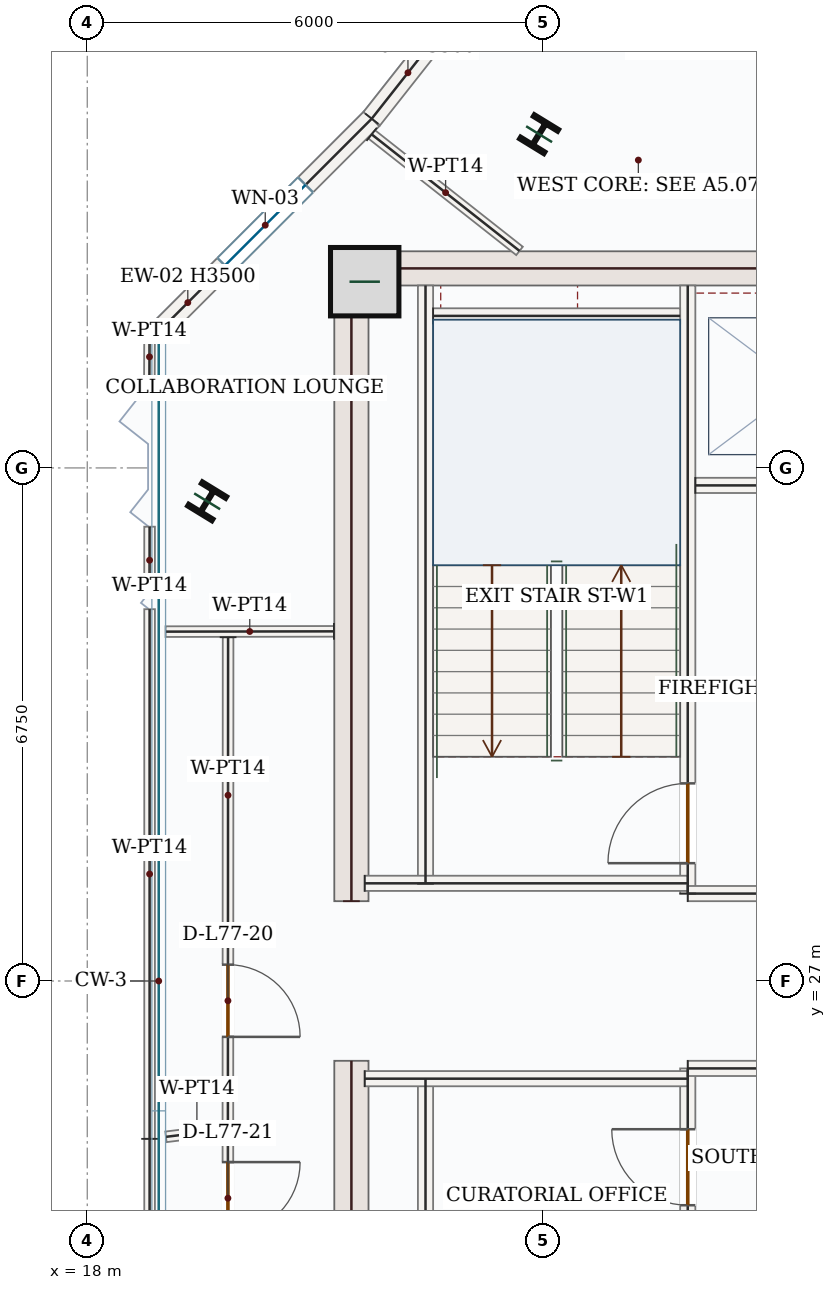
"""IFC4 building model, lengths in metres.
Left out: names, types, materials, properties, quantities, classifications, styles, units other than length and angle.
Written with IfcOpenShell. Run it as: python <this file> out.ifc"""

import sys

from ifc_helpers import new_model, si_unit, direction, frame, frame_2d, origin, origin_2d, place, context, subcontext, project, spatial, rectangle, i_section, extrude, source, transform, mapped, element, fill, save


model = new_model("IFC4")
c1 = context("Model", 3, precision=1e-05, world=origin(), true_north=direction((0.0, 1.0)))
c2 = subcontext(c1, "Body", "Model", "MODEL_VIEW")
j1 = project(units=[si_unit("LENGTHUNIT", "METRE"), si_unit("PLANEANGLEUNIT", "RADIAN")], contexts=[c1])
p1 = place(None, origin())
s1 = spatial("IfcSite", under=j1, at=p1, CompositionType="ELEMENT")
p2 = place(p1, origin())
s2 = spatial("IfcBuilding", under=s1, at=p2, CompositionType="ELEMENT")
p3 = place(p2, frame((0.0, 0.0, 319.8)))
s3 = spatial("IfcBuildingStorey", under=s2, at=p3, CompositionType="ELEMENT", Elevation=319.8)
m1 = source(origin(), c2, "Body", "SweptSolid", [
    extrude(rectangle(XDim=8.55, YDim=0.45, at=frame_2d((4.275, 0.0))), origin(), (0.0, 0.0, 1.0), 3.5),
])
for number, where, z_axis, x_axis in (
    (1, (21.475, 17.4, 0.0), (0.0, 0.0, 1.0), (0.0, 1.0, 0.0)),
    (2, (21.475, 28.05, 0.0), (0.0, 0.0, 1.0), (0.0, 1.0, 0.0)),
):
    element("IfcWall", number, at=place(p3, frame(where, z_axis=z_axis, x_axis=x_axis)), inside=s3, PredefinedType="SHEAR", context=c2, shape_type="MappedRepresentation", body=[
        mapped(m1, transform((0.0, 0.0, 0.0), x_axis=(1.0, 0.0, 0.0), y_axis=(0.0, 1.0, 0.0), z_axis=(0.0, 0.0, 1.0), scale=1.0)),
    ])
m2 = source(origin(), c2, "Body", "SweptSolid", [
    extrude(rectangle(XDim=7.1, YDim=0.45, at=frame_2d((3.55, 0.0))), origin(), (0.0, 0.0, 1.0), 3.5),
])
p4 = place(p3, frame((21.7, 36.375, 0.0), z_axis=(0.0, 0.0, 1.0), x_axis=(1.0, 0.0, 0.0)))
e3 = element("IfcWall", 3, at=p4, inside=s3, PredefinedType="SHEAR", context=c2, shape_type="MappedRepresentation", body=[
    mapped(m2, transform((0.0, 0.0, 0.0), x_axis=(1.0, 0.0, 0.0), y_axis=(0.0, 1.0, 0.0), z_axis=(0.0, 0.0, 1.0), scale=1.0)),
])
m3 = source(origin(), c2, "Body", "SweptSolid", [
    extrude(rectangle(XDim=0.9, YDim=0.9, at=origin_2d()), origin(), (0.0, 0.0, 1.0), 3.75),
])
p5 = place(p3, frame((21.65, 36.2, 0.0), z_axis=(0.0, 0.0, 1.0), x_axis=(1.0, 0.0, 0.0)))
e4 = element("IfcColumn", 4, at=p5, inside=s3, PredefinedType="COLUMN", context=c2, shape_type="MappedRepresentation", body=[
    mapped(m3, transform((0.0, 0.0, 0.0), x_axis=(1.0, 0.0, 0.0), y_axis=(0.0, 1.0, 0.0), z_axis=(0.0, 0.0, 1.0), scale=1.0)),
])
m4 = source(origin(), c2, "Body", "SweptSolid", [
    extrude(i_section(OverallWidth=0.374, OverallDepth=0.372, WebThickness=0.016, FlangeThickness=0.026, FilletRadius=0.018, at=origin_2d()), origin(), (0.0, 0.0, 1.0), 3.75),
])
for number, where, z_axis, x_axis in (
    (5, (23.945, 38.141, 0.0), (0.0, 0.0, 1.0), (-0.853, 0.522, 0.0)),
    (6, (19.577, 33.311, 0.0), (0.0, 0.0, 1.0), (-0.853, 0.522, 0.0)),
):
    element("IfcColumn", number, at=place(p3, frame(where, z_axis=z_axis, x_axis=x_axis)), inside=s3, PredefinedType="COLUMN", context=c2, shape_type="MappedRepresentation", body=[
        mapped(m4, transform((0.0, 0.0, 0.0), x_axis=(1.0, 0.0, 0.0), y_axis=(0.0, 1.0, 0.0), z_axis=(0.0, 0.0, 1.0), scale=1.0)),
    ])
p6 = place(p3, frame((18.94, 35.542, 0.0), z_axis=(0.0, 0.0, 1.0), x_axis=(0.707106781187, 0.707106781187, 0.0)))
e7 = element("IfcWall", 7, at=p6, inside=s3, PredefinedType="SOLIDWALL", context=c2, shape_type="SweptSolid", body=[
    extrude(rectangle(XDim=3.963, YDim=0.28, at=frame_2d((1.982, 0.0))), origin(), (0.0, 0.0, 1.0), 3.5),
])
p7 = place(p6, frame((1.232, 0.0, 0.85)))
e8 = element("IfcOpeningElement", 8, at=p7, cuts=e7, PredefinedType="OPENING", context=c2, shape_type="SweptSolid", body=[
    extrude(rectangle(XDim=1.5, YDim=1.5, at=frame_2d((0.75, 0.75))), frame((0.0, 0.15, 0.0), z_axis=(0.0, -1.0, 0.0), x_axis=(1.0, 0.0, 0.0)), (0.0, 0.0, 1.0), 0.3),
])
p8 = place(p3, frame((21.742, 38.344, 0.0), z_axis=(0.0, 0.0, 1.0), x_axis=(0.619093990715, 0.785316898239, 0.0)))
e9 = element("IfcWall", 9, at=p8, inside=s3, PredefinedType="SOLIDWALL", context=c2, shape_type="SweptSolid", body=[
    extrude(rectangle(XDim=4.878, YDim=0.28, at=frame_2d((2.439, 0.0))), origin(), (0.0, 0.0, 1.0), 3.5),
])
p9 = place(p8, frame((1.689, 0.0, 0.85)))
e10 = element("IfcOpeningElement", 10, at=p9, cuts=e9, PredefinedType="OPENING", context=c2, shape_type="SweptSolid", body=[
    extrude(rectangle(XDim=1.5, YDim=1.5, at=frame_2d((0.75, 0.75))), frame((0.0, 0.15, 0.0), z_axis=(0.0, -1.0, 0.0), x_axis=(1.0, 0.0, 0.0)), (0.0, 0.0, 1.0), 0.3),
])
m5 = source(origin(), c2, "Body", "SweptSolid", [
    extrude(rectangle(XDim=7.87, YDim=0.2, at=frame_2d((3.935, 0.0))), origin(), (0.0, 0.0, 1.0), 3.5),
])
for number, where, z_axis, x_axis in (
    (11, (22.45, 17.85, 0.0), (0.0, 0.0, 1.0), (0.0, 1.0, 0.0)),
    (12, (22.45, 28.28, 0.0), (0.0, 0.0, 1.0), (0.0, 1.0, 0.0)),
):
    element("IfcWall", number, at=place(p3, frame(where, z_axis=z_axis, x_axis=x_axis)), inside=s3, PredefinedType="SOLIDWALL", context=c2, shape_type="MappedRepresentation", body=[
        mapped(m5, transform((0.0, 0.0, 0.0), x_axis=(1.0, 0.0, 0.0), y_axis=(0.0, 1.0, 0.0), z_axis=(0.0, 0.0, 1.0), scale=1.0)),
    ])
p10 = place(p3, frame((25.9, 17.85, 0.0), z_axis=(0.0, 0.0, 1.0), x_axis=(0.0, 1.0, 0.0)))
e13 = element("IfcWall", 13, at=p10, inside=s3, PredefinedType="SOLIDWALL", context=c2, shape_type="SweptSolid", body=[
    extrude(rectangle(XDim=8.0, YDim=0.2, at=frame_2d((4.0, 0.0))), origin(), (0.0, 0.0, 1.0), 3.5),
])
p11 = place(p10, frame((6.2, 0.0, 0.0)))
e14 = element("IfcOpeningElement", 14, at=p11, cuts=e13, PredefinedType="OPENING", context=c2, shape_type="SweptSolid", body=[
    extrude(rectangle(XDim=1.0, YDim=2.15, at=frame_2d((0.5, 1.075))), frame((0.0, 0.11, 0.0), z_axis=(0.0, -1.0, 0.0), x_axis=(1.0, 0.0, 0.0)), (0.0, 0.0, 1.0), 0.22),
])
p12 = place(p10, frame((0.6, 0.0, 0.0)))
e15 = element("IfcOpeningElement", 15, at=p12, cuts=e13, PredefinedType="OPENING", context=c2, shape_type="SweptSolid", body=[
    extrude(rectangle(XDim=0.88, YDim=2.1, at=frame_2d((0.44, 1.05))), frame((0.0, 0.11, 0.0), z_axis=(0.0, -1.0, 0.0), x_axis=(1.0, 0.0, 0.0)), (0.0, 0.0, 1.0), 0.22),
])
p13 = place(p3, frame((25.9, 28.15, 0.0), z_axis=(0.0, 0.0, 1.0), x_axis=(0.0, 1.0, 0.0)))
e16 = element("IfcWall", 16, at=p13, inside=s3, PredefinedType="SOLIDWALL", context=c2, shape_type="SweptSolid", body=[
    extrude(rectangle(XDim=8.0, YDim=0.2, at=frame_2d((4.0, 0.0))), origin(), (0.0, 0.0, 1.0), 3.5),
])
p14 = place(p13, frame((0.4, 0.0, 0.0)))
e17 = element("IfcOpeningElement", 17, at=p14, cuts=e16, PredefinedType="OPENING", context=c2, shape_type="SweptSolid", body=[
    extrude(rectangle(XDim=1.05, YDim=2.15, at=frame_2d((0.525, 1.075))), frame((0.0, 0.11, 0.0), z_axis=(0.0, -1.0, 0.0), x_axis=(1.0, 0.0, 0.0)), (0.0, 0.0, 1.0), 0.22),
])
m6 = source(origin(), c2, "Body", "SweptSolid", [
    extrude(rectangle(XDim=4.25, YDim=0.2, at=frame_2d((2.125, 0.0))), origin(), (0.0, 0.0, 1.0), 3.5),
])
p15 = place(p3, frame((21.65, 25.715, 0.0), z_axis=(0.0, 0.0, 1.0), x_axis=(1.0, 0.0, 0.0)))
e18 = element("IfcWall", 18, at=p15, inside=s3, PredefinedType="SOLIDWALL", context=c2, shape_type="MappedRepresentation", body=[
    mapped(m6, transform((0.0, 0.0, 0.0), x_axis=(1.0, 0.0, 0.0), y_axis=(0.0, 1.0, 0.0), z_axis=(0.0, 0.0, 1.0), scale=1.0)),
])
m7 = source(origin(), c2, "Body", "SweptSolid", [
    extrude(rectangle(XDim=3.0, YDim=0.2, at=frame_2d((1.5, 0.0))), origin(), (0.0, 0.0, 1.0), 3.5),
])
p16 = place(p3, frame((25.9, 25.85, 0.0), z_axis=(0.0, 0.0, 1.0), x_axis=(1.0, 0.0, 0.0)))
e19 = element("IfcWall", 19, at=p16, inside=s3, PredefinedType="SOLIDWALL", context=c2, shape_type="MappedRepresentation", body=[
    mapped(m7, transform((0.0, 0.0, 0.0), x_axis=(1.0, 0.0, 0.0), y_axis=(0.0, 1.0, 0.0), z_axis=(0.0, 0.0, 1.0), scale=1.0)),
])
p17 = place(p3, frame((21.65, 28.285, 0.0), z_axis=(0.0, 0.0, 1.0), x_axis=(1.0, 0.0, 0.0)))
e20 = element("IfcWall", 20, at=p17, inside=s3, PredefinedType="SOLIDWALL", context=c2, shape_type="MappedRepresentation", body=[
    mapped(m6, transform((0.0, 0.0, 0.0), x_axis=(1.0, 0.0, 0.0), y_axis=(0.0, 1.0, 0.0), z_axis=(0.0, 0.0, 1.0), scale=1.0)),
])
p18 = place(p3, frame((25.9, 28.15, 0.0), z_axis=(0.0, 0.0, 1.0), x_axis=(1.0, 0.0, 0.0)))
e21 = element("IfcWall", 21, at=p18, inside=s3, PredefinedType="SOLIDWALL", context=c2, shape_type="MappedRepresentation", body=[
    mapped(m7, transform((0.0, 0.0, 0.0), x_axis=(1.0, 0.0, 0.0), y_axis=(0.0, 1.0, 0.0), z_axis=(0.0, 0.0, 1.0), scale=1.0)),
])
m8 = source(origin(), c2, "Body", "SweptSolid", [
    extrude(rectangle(XDim=3.25, YDim=0.2, at=frame_2d((1.625, 0.0))), origin(), (0.0, 0.0, 1.0), 3.5),
])
p19 = place(p3, frame((22.55, 35.75, 0.0), z_axis=(0.0, 0.0, 1.0), x_axis=(1.0, 0.0, 0.0)))
e22 = element("IfcWall", 22, at=p19, inside=s3, PredefinedType="SOLIDWALL", context=c2, shape_type="MappedRepresentation", body=[
    mapped(m8, transform((0.0, 0.0, 0.0), x_axis=(1.0, 0.0, 0.0), y_axis=(0.0, 1.0, 0.0), z_axis=(0.0, 0.0, 1.0), scale=1.0)),
])
p20 = place(p3, frame((26.0, 33.52, 0.0), z_axis=(0.0, 0.0, 1.0), x_axis=(1.0, 0.0, 0.0)))
e23 = element("IfcWall", 23, at=p20, inside=s3, PredefinedType="SOLIDWALL", context=c2, shape_type="SweptSolid", body=[
    extrude(rectangle(XDim=2.75, YDim=0.2, at=frame_2d((1.375, 0.0))), origin(), (0.0, 0.0, 1.0), 3.5),
])
p21 = place(p20, frame((0.82, 0.0, 0.0)))
e24 = element("IfcOpeningElement", 24, at=p21, cuts=e23, PredefinedType="OPENING", context=c2, shape_type="SweptSolid", body=[
    extrude(rectangle(XDim=1.1, YDim=2.15, at=frame_2d((0.55, 1.075))), frame((0.0, 0.11, 0.0), z_axis=(0.0, -1.0, 0.0), x_axis=(1.0, 0.0, 0.0)), (0.0, 0.0, 1.0), 0.22),
])
m9 = source(origin(), c2, "Body", "SweptSolid", [
    extrude(rectangle(XDim=2.215, YDim=0.14, at=frame_2d((1.107, 0.0))), origin(), (0.0, 0.0, 1.0), 3.5),
])
p22 = place(p3, frame((21.245, 31.6, 0.0), z_axis=(0.0, 0.0, 1.0), x_axis=(-0.999998633374, -0.001653254657, 0.0)))
e25 = element("IfcWall", 25, at=p22, inside=s3, PredefinedType="PARTITIONING", context=c2, shape_type="MappedRepresentation", body=[
    mapped(m9, transform((0.0, 0.0, 0.0), x_axis=(1.0, 0.0, 0.0), y_axis=(0.0, 1.0, 0.0), z_axis=(0.0, 0.0, 1.0), scale=1.0)),
])
p23 = place(p3, frame((19.853, 31.523, 0.0), z_axis=(0.0, 0.0, 1.0), x_axis=(-0.000377187662, -0.999999928865, 0.0)))
e26 = element("IfcWall", 26, at=p23, inside=s3, PredefinedType="PARTITIONING", context=c2, shape_type="SweptSolid", body=[
    extrude(rectangle(XDim=6.473, YDim=0.14, at=frame_2d((3.236, 0.0))), origin(), (0.0, 0.0, 1.0), 3.5),
])
p24 = place(p23, frame((4.308, 0.0, 0.0)))
e27 = element("IfcOpeningElement", 27, at=p24, cuts=e26, PredefinedType="OPENING", context=c2, shape_type="SweptSolid", body=[
    extrude(rectangle(XDim=0.95, YDim=2.15, at=frame_2d((0.475, 1.075))), frame((0.0, 0.08, 0.0), z_axis=(0.0, -1.0, 0.0), x_axis=(1.0, 0.0, 0.0)), (0.0, 0.0, 1.0), 0.16),
])
m10 = source(origin(), c2, "Body", "SweptSolid", [
    extrude(rectangle(XDim=0.821, YDim=0.14, at=frame_2d((0.41, 0.0))), origin(), (0.0, 0.0, 1.0), 3.5),
])
p25 = place(p3, frame((19.85, 25.05, 0.0), z_axis=(0.0, 0.0, 1.0), x_axis=(-0.992500466698, -0.122240842617, 0.0)))
e28 = element("IfcWall", 28, at=p25, inside=s3, PredefinedType="PARTITIONING", context=c2, shape_type="MappedRepresentation", body=[
    mapped(m10, transform((0.0, 0.0, 0.0), x_axis=(1.0, 0.0, 0.0), y_axis=(0.0, 1.0, 0.0), z_axis=(0.0, 0.0, 1.0), scale=1.0)),
])
m11 = source(origin(), c2, "Body", "SweptSolid", [
    extrude(rectangle(XDim=6.968, YDim=0.14, at=frame_2d((3.484, 0.0))), origin(), (0.0, 0.0, 1.0), 3.5),
])
p26 = place(p3, frame((18.82, 24.923, 0.0), z_axis=(0.0, 0.0, 1.0), x_axis=(0.0, 1.0, 0.0)))
e29 = element("IfcWall", 29, at=p26, inside=s3, PredefinedType="PARTITIONING", context=c2, shape_type="MappedRepresentation", body=[
    mapped(m11, transform((0.0, 0.0, 0.0), x_axis=(1.0, 0.0, 0.0), y_axis=(0.0, 1.0, 0.0), z_axis=(0.0, 0.0, 1.0), scale=1.0)),
])
m12 = source(origin(), c2, "Body", "SweptSolid", [
    extrude(rectangle(XDim=0.882, YDim=0.14, at=frame_2d((0.441, 0.0))), origin(), (0.0, 0.0, 1.0), 3.5),
])
p27 = place(p3, frame((18.82, 32.095, 0.0), z_axis=(0.0, 0.0, 1.0), x_axis=(0.000553556516, 0.999999846788, 0.0)))
e30 = element("IfcWall", 30, at=p27, inside=s3, PredefinedType="PARTITIONING", context=c2, shape_type="MappedRepresentation", body=[
    mapped(m12, transform((0.0, 0.0, 0.0), x_axis=(1.0, 0.0, 0.0), y_axis=(0.0, 1.0, 0.0), z_axis=(0.0, 0.0, 1.0), scale=1.0)),
])
m13 = source(origin(), c2, "Body", "SweptSolid", [
    extrude(rectangle(XDim=0.762, YDim=0.14, at=frame_2d((0.381, 0.0))), origin(), (0.0, 0.0, 1.0), 3.5),
])
p28 = place(p3, frame((18.817, 34.83, 0.0), z_axis=(0.0, 0.0, 1.0), x_axis=(0.004166630498, 0.999991319557, 0.0)))
e31 = element("IfcWall", 31, at=p28, inside=s3, PredefinedType="PARTITIONING", context=c2, shape_type="MappedRepresentation", body=[
    mapped(m13, transform((0.0, 0.0, 0.0), x_axis=(1.0, 0.0, 0.0), y_axis=(0.0, 1.0, 0.0), z_axis=(0.0, 0.0, 1.0), scale=1.0)),
])
m14 = source(origin(), c2, "Body", "SweptSolid", [
    extrude(rectangle(XDim=2.477, YDim=0.14, at=frame_2d((1.239, 0.0))), origin(), (0.0, 0.0, 1.0), 3.5),
])
p29 = place(p3, frame((21.742, 38.138, 0.0), z_axis=(0.0, 0.0, 1.0), x_axis=(0.785339198937, -0.619065701371, 0.0)))
e32 = element("IfcWall", 32, at=p29, inside=s3, PredefinedType="PARTITIONING", context=c2, shape_type="MappedRepresentation", body=[
    mapped(m14, transform((0.0, 0.0, 0.0), x_axis=(1.0, 0.0, 0.0), y_axis=(0.0, 1.0, 0.0), z_axis=(0.0, 0.0, 1.0), scale=1.0)),
])
p30 = place(p3, frame((19.85, 24.975, 0.0), z_axis=(0.0, 0.0, 1.0), x_axis=(0.000379434615, -0.999999928015, 0.0)))
e33 = element("IfcWall", 33, at=p30, inside=s3, PredefinedType="PARTITIONING", context=c2, shape_type="SweptSolid", body=[
    extrude(rectangle(XDim=2.574, YDim=0.14, at=frame_2d((1.287, 0.0))), origin(), (0.0, 0.0, 1.0), 3.5),
])
p31 = place(p30, frame((0.357, 0.0, 0.0)))
e34 = element("IfcOpeningElement", 34, at=p31, cuts=e33, PredefinedType="OPENING", context=c2, shape_type="SweptSolid", body=[
    extrude(rectangle(XDim=0.95, YDim=2.15, at=frame_2d((0.475, 1.075))), frame((0.0, 0.08, 0.0), z_axis=(0.0, -1.0, 0.0), x_axis=(1.0, 0.0, 0.0)), (0.0, 0.0, 1.0), 0.16),
])
m15 = source(origin(), c2, "Body", "SweptSolid", [
    extrude(rectangle(XDim=6.515, YDim=0.14, at=frame_2d((3.258, 0.0))), origin(), (0.0, 0.0, 1.0), 3.5),
])
p32 = place(p3, frame((18.82, 18.408, 0.0), z_axis=(0.0, 0.0, 1.0), x_axis=(0.0, 1.0, 0.0)))
e35 = element("IfcWall", 35, at=p32, inside=s3, PredefinedType="PARTITIONING", context=c2, shape_type="MappedRepresentation", body=[
    mapped(m15, transform((0.0, 0.0, 0.0), x_axis=(1.0, 0.0, 0.0), y_axis=(0.0, 1.0, 0.0), z_axis=(0.0, 0.0, 1.0), scale=1.0)),
])
m16 = source(origin(), c2, "Body", "SweptSolid", [
    extrude(rectangle(XDim=1.5, YDim=1.5, at=frame_2d((0.75, 0.75))), frame((0.0, 0.03, 0.0), z_axis=(0.0, -1.0, 0.0), x_axis=(1.0, 0.0, 0.0)), (0.0, 0.0, 1.0), 0.06),
])
p33 = place(p7, origin())
e36 = element("IfcWindow", 36, at=p33, inside=s3, PartitioningType="SINGLE_PANEL", PredefinedType="WINDOW", context=c2, shape_type="MappedRepresentation", body=[
    mapped(m16, transform((0.0, 0.0, 0.0), x_axis=(1.0, 0.0, 0.0), y_axis=(0.0, 1.0, 0.0), z_axis=(0.0, 0.0, 1.0), scale=1.0)),
])
fill(e8, e36)
m17 = source(origin(), c2, "Body", "SweptSolid", [
    extrude(rectangle(XDim=1.05, YDim=2.15, at=frame_2d((0.525, 1.075))), frame((0.0, 0.025, 0.0), z_axis=(0.0, -1.0, 0.0), x_axis=(1.0, 0.0, 0.0)), (0.0, 0.0, 1.0), 0.05),
])
p34 = place(p14, origin())
e37 = element("IfcDoor", 37, at=p34, inside=s3, OperationType="SINGLE_SWING_LEFT", PredefinedType="DOOR", context=c2, shape_type="MappedRepresentation", body=[
    mapped(m17, transform((0.0, 0.0, 0.0), x_axis=(1.0, 0.0, 0.0), y_axis=(0.0, 1.0, 0.0), z_axis=(0.0, 0.0, 1.0), scale=1.0)),
])
fill(e17, e37)
m18 = source(origin(), c2, "Body", "SweptSolid", [
    extrude(rectangle(XDim=1.0, YDim=2.15, at=frame_2d((0.5, 1.075))), frame((0.0, 0.025, 0.0), z_axis=(0.0, -1.0, 0.0), x_axis=(1.0, 0.0, 0.0)), (0.0, 0.0, 1.0), 0.05),
])
p35 = place(p11, origin())
e38 = element("IfcDoor", 38, at=p35, inside=s3, OperationType="SINGLE_SWING_RIGHT", PredefinedType="DOOR", context=c2, shape_type="MappedRepresentation", body=[
    mapped(m18, transform((0.0, 0.0, 0.0), x_axis=(1.0, 0.0, 0.0), y_axis=(0.0, 1.0, 0.0), z_axis=(0.0, 0.0, 1.0), scale=1.0)),
])
fill(e14, e38)
m19 = source(origin(), c2, "Body", "SweptSolid", [
    extrude(rectangle(XDim=0.95, YDim=2.15, at=frame_2d((0.475, 1.075))), frame((0.0, 0.025, 0.0), z_axis=(0.0, -1.0, 0.0), x_axis=(1.0, 0.0, 0.0)), (0.0, 0.0, 1.0), 0.05),
])
p36 = place(p24, origin())
e39 = element("IfcDoor", 39, at=p36, inside=s3, OperationType="SINGLE_SWING_RIGHT", PredefinedType="DOOR", context=c2, shape_type="MappedRepresentation", body=[
    mapped(m19, transform((0.0, 0.0, 0.0), x_axis=(1.0, 0.0, 0.0), y_axis=(0.0, 1.0, 0.0), z_axis=(0.0, 0.0, 1.0), scale=1.0)),
])
fill(e27, e39)
p37 = place(p31, origin())
e40 = element("IfcDoor", 40, at=p37, inside=s3, OperationType="SINGLE_SWING_LEFT", PredefinedType="DOOR", context=c2, shape_type="MappedRepresentation", body=[
    mapped(m19, transform((0.0, 0.0, 0.0), x_axis=(1.0, 0.0, 0.0), y_axis=(0.0, 1.0, 0.0), z_axis=(0.0, 0.0, 1.0), scale=1.0)),
])
fill(e34, e40)
save(model, sys.argv[1])
